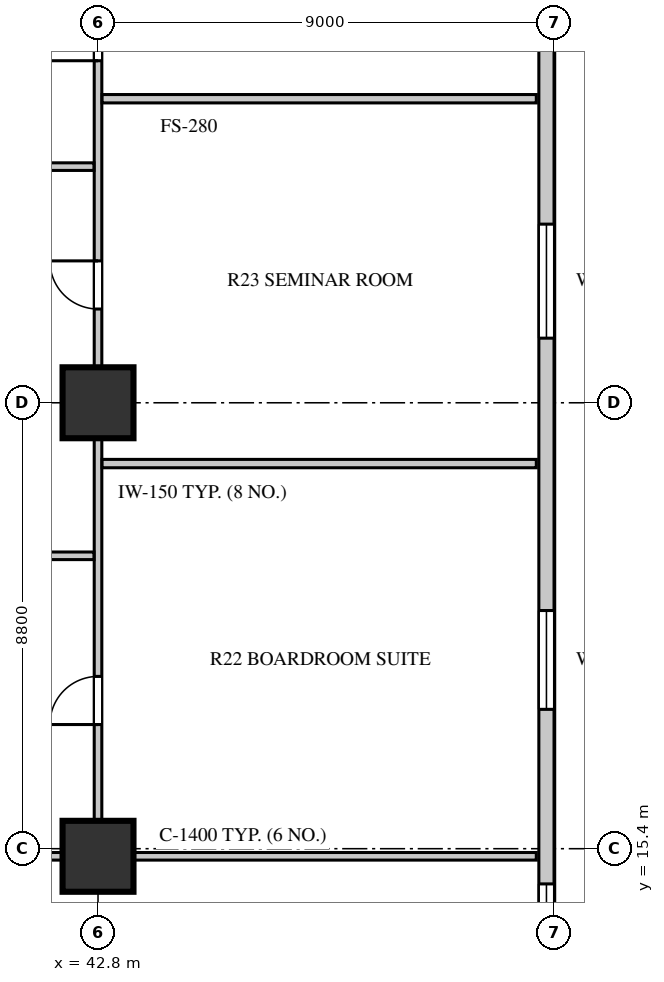
"""IFC4 building model, lengths in metres.
Left out: names, types, materials, properties, quantities, classifications, styles, units other than length and angle.
Written with IfcOpenShell. Run it as: python <this file> out.ifc"""

import sys

from ifc_helpers import new_model, si_unit, direction, frame, frame_2d, origin, origin_2d, place, context, subcontext, project, spatial, rectangle, extrude, element, fill, save


model = new_model("IFC4")
c1 = context("Model", 3, precision=1e-05, world=origin(), true_north=direction((0.0, 1.0)))
c2 = subcontext(c1, "Body", "Model", "MODEL_VIEW")
j1 = project(units=[si_unit("LENGTHUNIT", "METRE"), si_unit("PLANEANGLEUNIT", "RADIAN")], contexts=[c1])
p1 = place(None, origin())
s1 = spatial("IfcSite", under=j1, at=p1, CompositionType="ELEMENT")
p2 = place(p1, origin())
s2 = spatial("IfcBuilding", under=s1, at=p2, CompositionType="ELEMENT")
p3 = place(p2, frame((0.0, 0.0, 21.5)))
s3 = spatial("IfcBuildingStorey", under=s2, at=p3, CompositionType="ELEMENT", Elevation=21.5)
for number, where, z_axis, x_axis in (
    (1, (42.8, 15.25, 0.0), (0.0, 0.0, 1.0), (1.0, 0.0, 0.0)),
    (2, (42.8, 24.2, 0.0), (0.0, 0.0, 1.0), (1.0, 0.0, 0.0)),
):
    element("IfcColumn", number, at=place(p3, frame(where, z_axis=z_axis, x_axis=x_axis)), inside=s3, PredefinedType="COLUMN", context=c2, shape_type="SweptSolid", body=[
        extrude(rectangle(XDim=1.4, YDim=1.4, at=origin_2d()), origin(), (0.0, 0.0, 1.0), 4.22),
    ])
p4 = place(p3, frame((51.65, 12.4, 0.0), z_axis=(0.0, 0.0, 1.0), x_axis=(0.0, 1.0, 0.0)))
e3 = element("IfcWall", 3, at=p4, inside=s3, PredefinedType="STANDARD", context=c2, shape_type="SweptSolid", body=[
    extrude(rectangle(XDim=32.4, YDim=0.3, at=frame_2d((16.2, 0.0))), origin(), (0.0, 0.0, 1.0), 4.22),
])
p5 = place(p4, frame((0.655, 0.0, 0.8)))
e4 = element("IfcOpeningElement", 4, at=p5, cuts=e3, PredefinedType="OPENING", context=c2, shape_type="SweptSolid", body=[
    extrude(rectangle(XDim=1.65, YDim=1.95, at=frame_2d((0.825, 0.975))), frame((0.0, 0.16, 0.0), z_axis=(0.0, -1.0, 0.0), x_axis=(1.0, 0.0, 0.0)), (0.0, 0.0, 1.0), 0.32),
])
p6 = place(p4, frame((5.75, 0.0, 0.8)))
e5 = element("IfcOpeningElement", 5, at=p6, cuts=e3, PredefinedType="OPENING", context=c2, shape_type="SweptSolid", body=[
    extrude(rectangle(XDim=1.95, YDim=2.0, at=frame_2d((0.975, 1.0))), frame((0.0, 0.16, 0.0), z_axis=(0.0, -1.0, 0.0), x_axis=(1.0, 0.0, 0.0)), (0.0, 0.0, 1.0), 0.32),
])
p7 = place(p4, frame((13.075, 0.0, 0.8)))
e6 = element("IfcOpeningElement", 6, at=p7, cuts=e3, PredefinedType="OPENING", context=c2, shape_type="SweptSolid", body=[
    extrude(rectangle(XDim=2.25, YDim=2.0, at=frame_2d((1.125, 1.0))), frame((0.0, 0.16, 0.0), z_axis=(0.0, -1.0, 0.0), x_axis=(1.0, 0.0, 0.0)), (0.0, 0.0, 1.0), 0.32),
])
p8 = place(p4, frame((19.35, 0.0, 0.8)))
e7 = element("IfcOpeningElement", 7, at=p8, cuts=e3, PredefinedType="OPENING", context=c2, shape_type="SweptSolid", body=[
    extrude(rectangle(XDim=1.8, YDim=2.0, at=frame_2d((0.9, 1.0))), frame((0.0, 0.16, 0.0), z_axis=(0.0, -1.0, 0.0), x_axis=(1.0, 0.0, 0.0)), (0.0, 0.0, 1.0), 0.32),
])
p9 = place(p4, frame((23.7, 0.0, 0.8)))
e8 = element("IfcOpeningElement", 8, at=p9, cuts=e3, PredefinedType="OPENING", context=c2, shape_type="SweptSolid", body=[
    extrude(rectangle(XDim=1.5, YDim=2.0, at=frame_2d((0.75, 1.0))), frame((0.0, 0.16, 0.0), z_axis=(0.0, -1.0, 0.0), x_axis=(1.0, 0.0, 0.0)), (0.0, 0.0, 1.0), 0.32),
])
p10 = place(p4, frame((27.275, 0.0, 0.8)))
e9 = element("IfcOpeningElement", 9, at=p10, cuts=e3, PredefinedType="OPENING", context=c2, shape_type="SweptSolid", body=[
    extrude(rectangle(XDim=1.2, YDim=1.75, at=frame_2d((0.6, 0.875))), frame((0.0, 0.16, 0.0), z_axis=(0.0, -1.0, 0.0), x_axis=(1.0, 0.0, 0.0)), (0.0, 0.0, 1.0), 0.32),
])
p11 = place(p4, frame((30.32, 0.0, 0.8)))
e10 = element("IfcOpeningElement", 10, at=p11, cuts=e3, PredefinedType="OPENING", context=c2, shape_type="SweptSolid", body=[
    extrude(rectangle(XDim=1.2, YDim=1.75, at=frame_2d((0.6, 0.875))), frame((0.0, 0.16, 0.0), z_axis=(0.0, -1.0, 0.0), x_axis=(1.0, 0.0, 0.0)), (0.0, 0.0, 1.0), 0.32),
])
p12 = place(p3, frame((42.8, 15.25, 0.0), z_axis=(0.0, 0.0, 1.0), x_axis=(0.0, 1.0, 0.0)))
e11 = element("IfcWall", 11, at=p12, inside=s3, PredefinedType="PARTITIONING", context=c2, shape_type="SweptSolid", body=[
    extrude(rectangle(XDim=26.7, YDim=0.15, at=frame_2d((13.35, 0.0))), origin(), (0.0, 0.0, 1.0), 3.42),
])
p13 = place(p12, frame((2.6, 0.0, 0.0)))
e12 = element("IfcOpeningElement", 12, at=p13, cuts=e11, PredefinedType="OPENING", context=c2, shape_type="SweptSolid", body=[
    extrude(rectangle(XDim=0.95, YDim=2.08, at=frame_2d((0.475, 1.04))), frame((0.0, 0.085, 0.0), z_axis=(0.0, -1.0, 0.0), x_axis=(1.0, 0.0, 0.0)), (0.0, 0.0, 1.0), 0.17),
])
p14 = place(p12, frame((10.8, 0.0, 0.0)))
e13 = element("IfcOpeningElement", 13, at=p14, cuts=e11, PredefinedType="OPENING", context=c2, shape_type="SweptSolid", body=[
    extrude(rectangle(XDim=0.95, YDim=2.08, at=frame_2d((0.475, 1.04))), frame((0.0, 0.085, 0.0), z_axis=(0.0, -1.0, 0.0), x_axis=(1.0, 0.0, 0.0)), (0.0, 0.0, 1.0), 0.17),
])
p15 = place(p12, frame((15.7, 0.0, 0.0)))
e14 = element("IfcOpeningElement", 14, at=p15, cuts=e11, PredefinedType="OPENING", context=c2, shape_type="SweptSolid", body=[
    extrude(rectangle(XDim=1.1, YDim=2.12, at=frame_2d((0.55, 1.06))), frame((0.0, 0.085, 0.0), z_axis=(0.0, -1.0, 0.0), x_axis=(1.0, 0.0, 0.0)), (0.0, 0.0, 1.0), 0.17),
])
p16 = place(p12, frame((20.6, 0.0, 0.0)))
e15 = element("IfcOpeningElement", 15, at=p16, cuts=e11, PredefinedType="OPENING", context=c2, shape_type="SweptSolid", body=[
    extrude(rectangle(XDim=0.9, YDim=2.05, at=frame_2d((0.45, 1.025))), frame((0.0, 0.085, 0.0), z_axis=(0.0, -1.0, 0.0), x_axis=(1.0, 0.0, 0.0)), (0.0, 0.0, 1.0), 0.17),
])
p17 = place(p12, frame((24.1, 0.0, 0.0)))
e16 = element("IfcOpeningElement", 16, at=p17, cuts=e11, PredefinedType="OPENING", context=c2, shape_type="SweptSolid", body=[
    extrude(rectangle(XDim=0.95, YDim=2.05, at=frame_2d((0.475, 1.025))), frame((0.0, 0.085, 0.0), z_axis=(0.0, -1.0, 0.0), x_axis=(1.0, 0.0, 0.0)), (0.0, 0.0, 1.0), 0.17),
])
p18 = place(p3, frame((38.75, 15.25, 0.0), z_axis=(0.0, 0.0, 1.0), x_axis=(1.0, 0.0, 0.0)))
e17 = element("IfcWall", 17, at=p18, inside=s3, PredefinedType="PARTITIONING", context=c2, shape_type="SweptSolid", body=[
    extrude(rectangle(XDim=12.7, YDim=0.15, at=frame_2d((6.35, 0.0))), origin(), (0.0, 0.0, 1.0), 3.42),
])
p19 = place(p3, frame((38.92, 21.18, 0.0), z_axis=(0.0, 0.0, 1.0), x_axis=(1.0, 0.0, 0.0)))
e18 = element("IfcWall", 18, at=p19, inside=s3, PredefinedType="PARTITIONING", context=c2, shape_type="SweptSolid", body=[
    extrude(rectangle(XDim=3.8, YDim=0.15, at=frame_2d((1.9, 0.0))), origin(), (0.0, 0.0, 1.0), 4.22),
])
p20 = place(p19, frame((1.1, 0.0, 0.0)))
e19 = element("IfcOpeningElement", 19, at=p20, cuts=e18, PredefinedType="OPENING", context=c2, shape_type="SweptSolid", body=[
    extrude(rectangle(XDim=1.05, YDim=2.1, at=frame_2d((0.525, 1.05))), frame((0.0, 0.085, 0.0), z_axis=(0.0, -1.0, 0.0), x_axis=(1.0, 0.0, 0.0)), (0.0, 0.0, 1.0), 0.17),
])
p21 = place(p3, frame((39.28, 28.86, 0.0), z_axis=(0.0, 0.0, 1.0), x_axis=(1.0, 0.0, 0.0)))
e20 = element("IfcWall", 20, at=p21, inside=s3, PredefinedType="PARTITIONING", context=c2, shape_type="SweptSolid", body=[
    extrude(rectangle(XDim=3.44, YDim=0.15, at=frame_2d((1.72, 0.0))), origin(), (0.0, 0.0, 1.0), 4.22),
])
p22 = place(p21, frame((0.74, 0.0, 0.0)))
e21 = element("IfcOpeningElement", 21, at=p22, cuts=e20, PredefinedType="OPENING", context=c2, shape_type="SweptSolid", body=[
    extrude(rectangle(XDim=0.95, YDim=2.08, at=frame_2d((0.475, 1.04))), frame((0.0, 0.085, 0.0), z_axis=(0.0, -1.0, 0.0), x_axis=(1.0, 0.0, 0.0)), (0.0, 0.0, 1.0), 0.17),
])
for number, where, z_axis, x_axis in (
    (22, (42.88, 23.0, 0.0), (0.0, 0.0, 1.0), (1.0, 0.0, 0.0)),
    (23, (42.88, 30.2, 0.0), (0.0, 0.0, 1.0), (1.0, 0.0, 0.0)),
):
    element("IfcWall", number, at=place(p3, frame(where, z_axis=z_axis, x_axis=x_axis)), inside=s3, PredefinedType="PARTITIONING", context=c2, shape_type="SweptSolid", body=[
        extrude(rectangle(XDim=8.57, YDim=0.165, at=frame_2d((4.285, 0.0))), origin(), (0.0, 0.0, 1.0), 4.22),
    ])
p23 = place(p5, origin())
e24 = element("IfcWindow", 24, at=p23, inside=s3, PartitioningType="SINGLE_PANEL", PredefinedType="WINDOW", context=c2, shape_type="SweptSolid", body=[
    extrude(rectangle(XDim=1.65, YDim=1.95, at=frame_2d((0.825, 0.975))), frame((0.0, 0.03, 0.0), z_axis=(0.0, -1.0, 0.0), x_axis=(1.0, 0.0, 0.0)), (0.0, 0.0, 1.0), 0.06),
])
fill(e4, e24)
p24 = place(p6, origin())
e25 = element("IfcWindow", 25, at=p24, inside=s3, PartitioningType="SINGLE_PANEL", PredefinedType="WINDOW", context=c2, shape_type="SweptSolid", body=[
    extrude(rectangle(XDim=1.95, YDim=2.0, at=frame_2d((0.975, 1.0))), frame((0.0, 0.03, 0.0), z_axis=(0.0, -1.0, 0.0), x_axis=(1.0, 0.0, 0.0)), (0.0, 0.0, 1.0), 0.06),
])
fill(e5, e25)
p25 = place(p7, origin())
e26 = element("IfcWindow", 26, at=p25, inside=s3, PartitioningType="SINGLE_PANEL", PredefinedType="WINDOW", context=c2, shape_type="SweptSolid", body=[
    extrude(rectangle(XDim=2.25, YDim=2.0, at=frame_2d((1.125, 1.0))), frame((0.0, 0.03, 0.0), z_axis=(0.0, -1.0, 0.0), x_axis=(1.0, 0.0, 0.0)), (0.0, 0.0, 1.0), 0.06),
])
fill(e6, e26)
p26 = place(p13, origin())
e27 = element("IfcDoor", 27, at=p26, inside=s3, OperationType="SINGLE_SWING_LEFT", PredefinedType="DOOR", context=c2, shape_type="SweptSolid", body=[
    extrude(rectangle(XDim=0.95, YDim=2.08, at=frame_2d((0.475, 1.04))), frame((0.0, 0.025, 0.0), z_axis=(0.0, -1.0, 0.0), x_axis=(1.0, 0.0, 0.0)), (0.0, 0.0, 1.0), 0.05),
])
fill(e12, e27)
p27 = place(p14, origin())
e28 = element("IfcDoor", 28, at=p27, inside=s3, OperationType="SINGLE_SWING_RIGHT", PredefinedType="DOOR", context=c2, shape_type="SweptSolid", body=[
    extrude(rectangle(XDim=0.95, YDim=2.08, at=frame_2d((0.475, 1.04))), frame((0.0, 0.025, 0.0), z_axis=(0.0, -1.0, 0.0), x_axis=(1.0, 0.0, 0.0)), (0.0, 0.0, 1.0), 0.05),
])
fill(e13, e28)
p28 = place(p15, origin())
e29 = element("IfcDoor", 29, at=p28, inside=s3, OperationType="SINGLE_SWING_LEFT", PredefinedType="DOOR", context=c2, shape_type="SweptSolid", body=[
    extrude(rectangle(XDim=1.1, YDim=2.12, at=frame_2d((0.55, 1.06))), frame((0.0, 0.025, 0.0), z_axis=(0.0, -1.0, 0.0), x_axis=(1.0, 0.0, 0.0)), (0.0, 0.0, 1.0), 0.05),
])
fill(e14, e29)
save(model, sys.argv[1])
